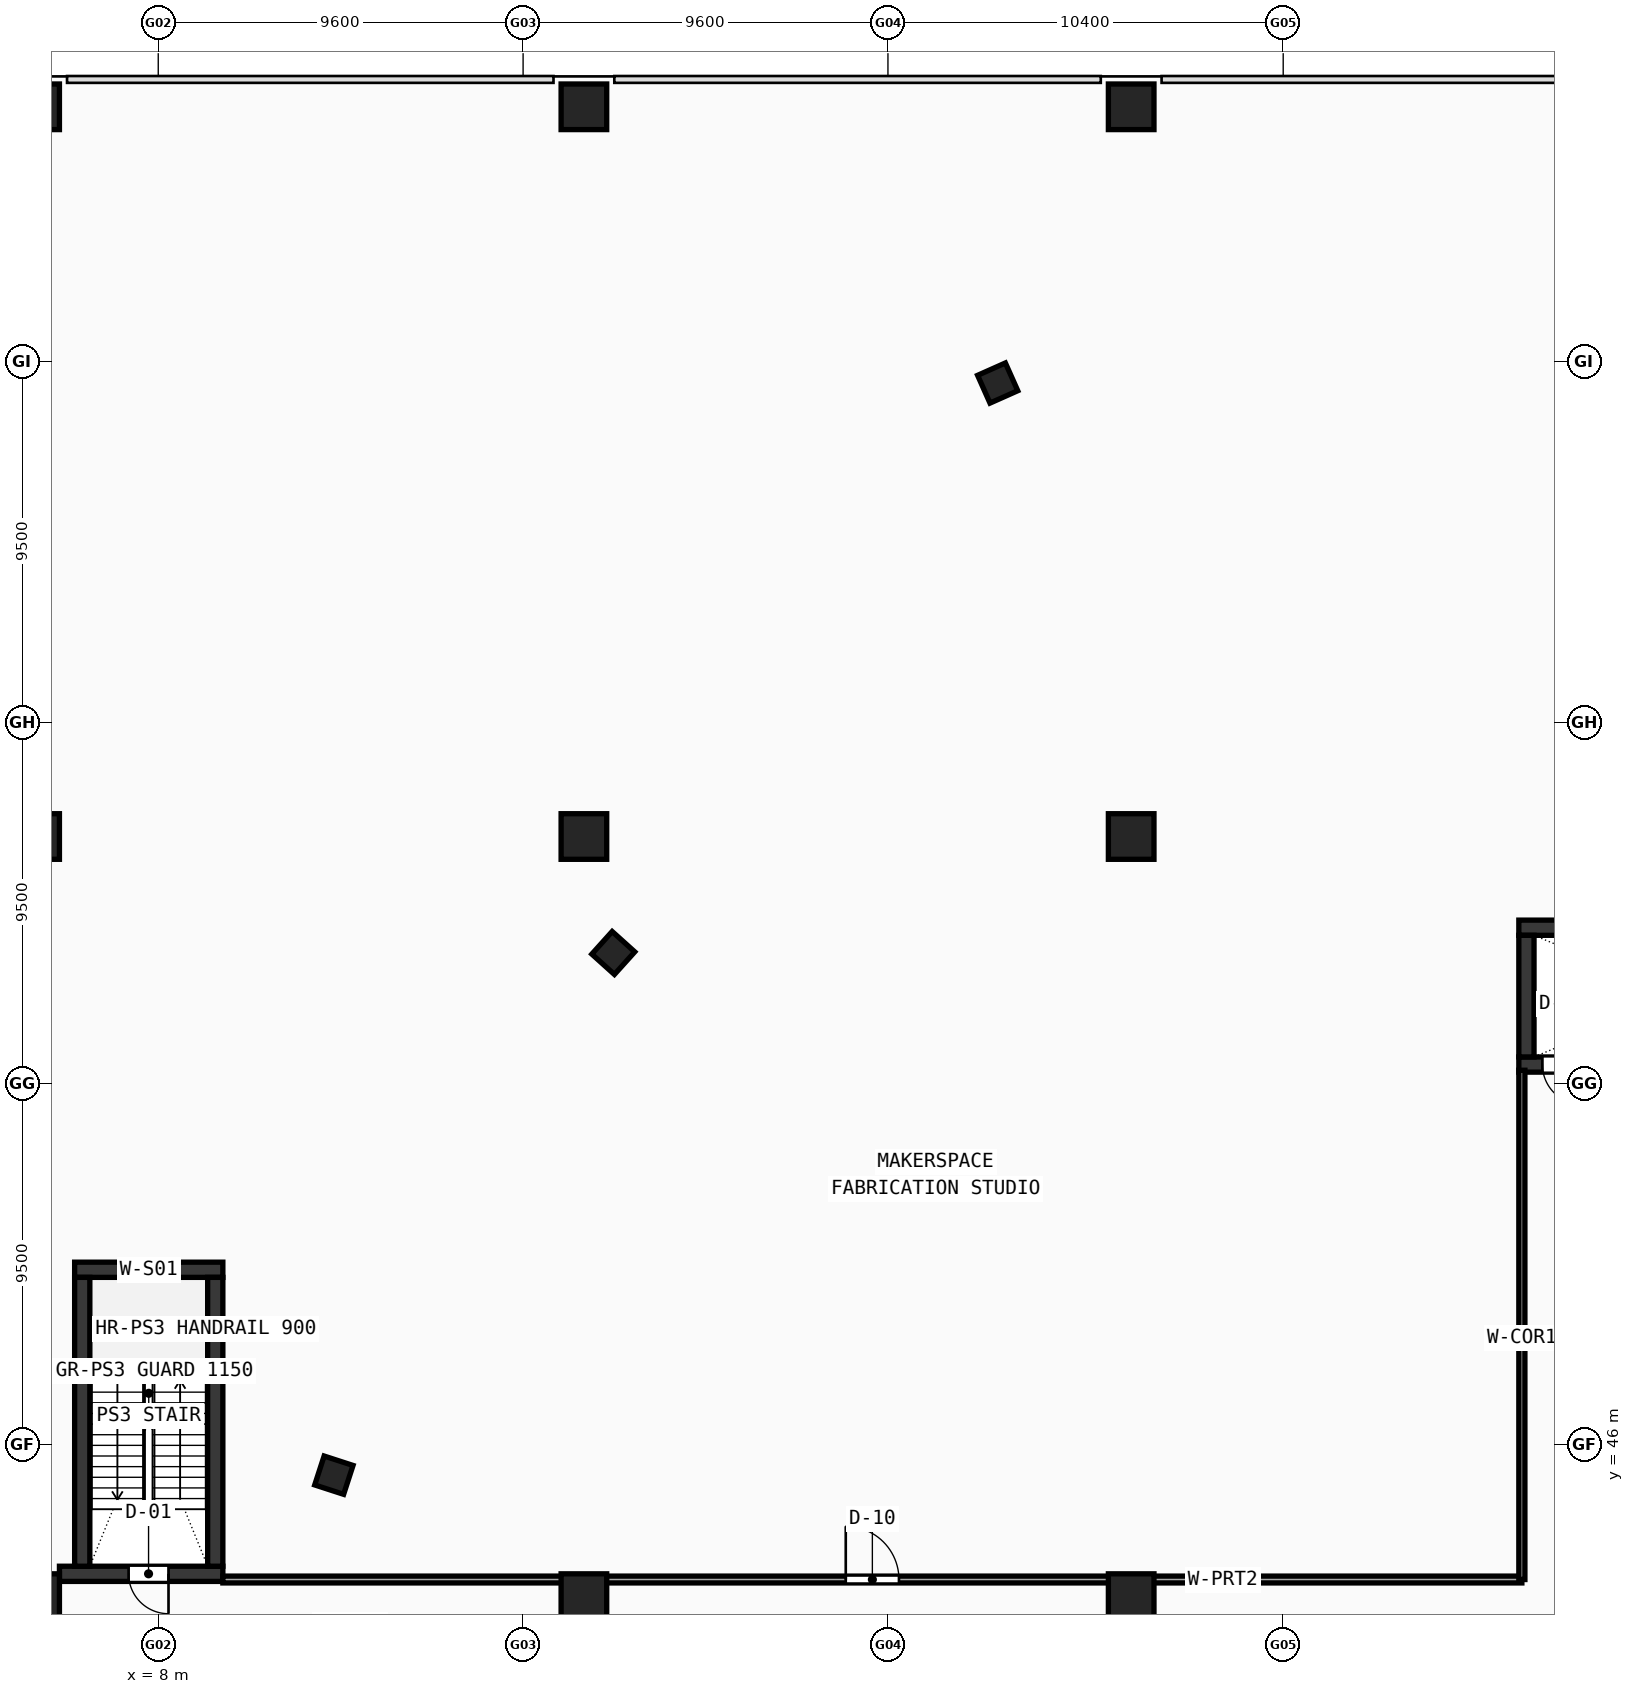
"""IFC4 building model, lengths in metres.
Left out: names, types, materials, properties, quantities, classifications, styles, units other than length and angle.
Written with IfcOpenShell. Run it as: python <this file> out.ifc"""

import sys

from ifc_helpers import new_model, si_unit, direction, frame, frame_2d, origin, origin_with_axes, origin_2d, place, context, subcontext, project, spatial, rectangle, hollow_rectangle, extrude, source, transform, mapped, element, fill, save


model = new_model("IFC4")
c1 = context("Model", 3, precision=1e-05, world=origin(), true_north=direction((0.0, 1.0)))
c2 = subcontext(c1, "Body", "Model", "MODEL_VIEW")
j1 = project(units=[si_unit("LENGTHUNIT", "METRE"), si_unit("PLANEANGLEUNIT", "RADIAN")], contexts=[c1])
p1 = place(None, origin())
s1 = spatial("IfcSite", under=j1, at=p1, CompositionType="ELEMENT")
p2 = place(p1, origin())
s2 = spatial("IfcBuilding", under=s1, at=p2, CompositionType="ELEMENT")
p3 = place(p2, frame((0.0, 0.0, 14.4)))
s3 = spatial("IfcBuildingStorey", under=s2, at=p3, CompositionType="ELEMENT", Elevation=14.4)
p4 = place(p3, frame((5.8, 50.6, 0.0), z_axis=(0.0, 0.0, 1.0), x_axis=(1.0, 0.0, 0.0)))
e1 = element("IfcWall", 1, at=p4, inside=s3, PredefinedType="SHEAR", context=c2, shape_type="SweptSolid", body=[
    extrude(rectangle(XDim=3.9, YDim=0.4, at=frame_2d((1.95, 0.0))), origin(), (0.0, 0.0, 1.0), 4.52),
])
p5 = place(p3, frame((5.4, 42.6, 0.0), z_axis=(0.0, 0.0, 1.0), x_axis=(1.0, 0.0, 0.0)))
e2 = element("IfcWall", 2, at=p5, inside=s3, PredefinedType="SHEAR", context=c2, shape_type="SweptSolid", body=[
    extrude(rectangle(XDim=4.3, YDim=0.4, at=frame_2d((2.15, 0.0))), origin(), (0.0, 0.0, 1.0), 4.52),
])
p6 = place(p5, frame((1.82, 0.0, 0.0)))
e3 = element("IfcOpeningElement", 3, at=p6, cuts=e2, PredefinedType="OPENING", context=c2, shape_type="SweptSolid", body=[
    extrude(rectangle(XDim=1.05, YDim=2.1, at=frame_2d((0.525, 1.05))), frame((0.0, 0.21, 0.0), z_axis=(0.0, -1.0, 0.0), x_axis=(1.0, 0.0, 0.0)), (0.0, 0.0, 1.0), 0.42),
])
for number, where, z_axis, x_axis in (
    (4, (6.0, 42.8, 0.0), (0.0, 0.0, 1.0), (0.0, 1.0, 0.0)),
    (5, (9.5, 42.8, 0.0), (0.0, 0.0, 1.0), (0.0, 1.0, 0.0)),
):
    element("IfcWall", number, at=place(p3, frame(where, z_axis=z_axis, x_axis=x_axis)), inside=s3, PredefinedType="SHEAR", context=c2, shape_type="SweptSolid", body=[
        extrude(rectangle(XDim=7.6, YDim=0.4, at=frame_2d((3.8, 0.0))), origin(), (0.0, 0.0, 1.0), 4.52),
    ])
p7 = place(p3, frame((43.8, 59.6, 0.0), z_axis=(0.0, 0.0, 1.0), x_axis=(1.0, 0.0, 0.0)))
e6 = element("IfcWall", 6, at=p7, inside=s3, PredefinedType="SHEAR", context=c2, shape_type="SweptSolid", body=[
    extrude(rectangle(XDim=8.5, YDim=0.4, at=frame_2d((4.25, 0.0))), origin(), (0.0, 0.0, 1.0), 4.52),
])
p8 = place(p3, frame((43.8, 56.0, 0.0), z_axis=(0.0, 0.0, 1.0), x_axis=(1.0, 0.0, 0.0)))
e7 = element("IfcWall", 7, at=p8, inside=s3, PredefinedType="SHEAR", context=c2, shape_type="SweptSolid", body=[
    extrude(rectangle(XDim=8.5, YDim=0.4, at=frame_2d((4.25, 0.0))), origin(), (0.0, 0.0, 1.0), 4.52),
])
p9 = place(p8, frame((0.62, 0.0, 0.0)))
e8 = element("IfcOpeningElement", 8, at=p9, cuts=e7, PredefinedType="OPENING", context=c2, shape_type="SweptSolid", body=[
    extrude(rectangle(XDim=1.05, YDim=2.1, at=frame_2d((0.525, 1.05))), frame((0.0, 0.21, 0.0), z_axis=(0.0, -1.0, 0.0), x_axis=(1.0, 0.0, 0.0)), (0.0, 0.0, 1.0), 0.42),
])
p10 = place(p3, frame((44.0, 56.2, 0.0), z_axis=(0.0, 0.0, 1.0), x_axis=(0.0, 1.0, 0.0)))
e9 = element("IfcWall", 9, at=p10, inside=s3, PredefinedType="SHEAR", context=c2, shape_type="SweptSolid", body=[
    extrude(rectangle(XDim=3.2, YDim=0.4, at=frame_2d((1.6, 0.0))), origin(), (0.0, 0.0, 1.0), 4.52),
])
m1 = source(origin(), c2, "Body", "SweptSolid", [
    extrude(hollow_rectangle(XDim=1.2, YDim=1.2, WallThickness=0.05, at=origin_2d()), origin(), (0.0, 0.0, 1.0), 4.8),
])
for number, where, z_axis, x_axis in (
    (10, (4.8, 42.0, -0.28), (0.0, 0.0, 1.0), (1.0, 0.0, 0.0)),
    (11, (4.8, 62.0, -0.28), (0.0, 0.0, 1.0), (1.0, 0.0, 0.0)),
    (12, (4.8, 81.2, -0.28), (0.0, 0.0, 1.0), (1.0, 0.0, 0.0)),
    (13, (19.2, 42.0, -0.28), (0.0, 0.0, 1.0), (1.0, 0.0, 0.0)),
    (14, (19.2, 62.0, -0.28), (0.0, 0.0, 1.0), (1.0, 0.0, 0.0)),
    (15, (19.2, 81.2, -0.28), (0.0, 0.0, 1.0), (1.0, 0.0, 0.0)),
    (16, (33.6, 42.0, -0.28), (0.0, 0.0, 1.0), (1.0, 0.0, 0.0)),
    (17, (33.6, 62.0, -0.28), (0.0, 0.0, 1.0), (1.0, 0.0, 0.0)),
    (18, (33.6, 81.2, -0.28), (0.0, 0.0, 1.0), (1.0, 0.0, 0.0)),
):
    element("IfcColumn", number, at=place(p3, frame(where, z_axis=z_axis, x_axis=x_axis)), inside=s3, PredefinedType="COLUMN", context=c2, shape_type="MappedRepresentation", body=[
        mapped(m1, transform((0.0, 0.0, 0.0), scale=1.0)),
    ])
m2 = source(origin(), c2, "Body", "SweptSolid", [
    extrude(hollow_rectangle(XDim=0.8, YDim=0.8, WallThickness=0.032, at=origin_2d()), origin(), (0.0, 0.0, 1.0), 4.8),
])
for number, where, z_axis, x_axis in (
    (19, (30.088, 73.932, -0.28), (0.0, 0.0, 1.0), (-0.914, -0.407, 0.0)),
    (20, (19.973, 58.935, -0.28), (0.0, 0.0, 1.0), (-0.669, -0.743, 0.0)),
    (21, (12.621, 45.196, -0.28), (0.0, 0.0, 1.0), (-0.309, -0.951, 0.0)),
):
    element("IfcColumn", number, at=place(p3, frame(where, z_axis=z_axis, x_axis=x_axis)), inside=s3, PredefinedType="COLUMN", context=c2, shape_type="MappedRepresentation", body=[
        mapped(m2, transform((0.0, 0.0, 0.0), scale=1.0)),
    ])
p11 = place(p3, frame((9.7, 42.45, 0.0), z_axis=(0.0, 0.0, 1.0), x_axis=(1.0, 0.0, 0.0)))
e22 = element("IfcWall", 22, at=p11, inside=s3, PredefinedType="PARTITIONING", context=c2, shape_type="SweptSolid", body=[
    extrude(rectangle(XDim=34.18, YDim=0.18, at=frame_2d((17.09, 0.0))), origin(), (0.0, 0.0, 1.0), 3.62),
])
p12 = place(p11, frame((16.39, 0.0, 0.0)))
e23 = element("IfcOpeningElement", 23, at=p12, cuts=e22, PredefinedType="OPENING", context=c2, shape_type="SweptSolid", body=[
    extrude(rectangle(XDim=1.4, YDim=2.15, at=frame_2d((0.7, 1.075))), frame((0.0, 0.1, 0.0), z_axis=(0.0, -1.0, 0.0), x_axis=(1.0, 0.0, 0.0)), (0.0, 0.0, 1.0), 0.2),
])
p13 = place(p3, frame((43.88, 42.45, 0.0), z_axis=(0.0, 0.0, 1.0), x_axis=(0.0, 1.0, 0.0)))
e24 = element("IfcWall", 24, at=p13, inside=s3, PredefinedType="PARTITIONING", context=c2, shape_type="SweptSolid", body=[
    extrude(rectangle(XDim=13.4, YDim=0.16, at=frame_2d((6.7, 0.0))), origin(), (0.0, 0.0, 1.0), 4.12),
])
m3 = source(origin(), c2, "Body", "SweptSolid", [
    extrude(rectangle(XDim=1.05, YDim=2.1, at=frame_2d((0.525, 1.05))), frame((0.0, 0.025, 0.0), z_axis=(0.0, -1.0, 0.0), x_axis=(1.0, 0.0, 0.0)), (0.0, 0.0, 1.0), 0.05),
])
p14 = place(p6, frame((1.05, 0.0, 0.0), z_axis=(0.0, 0.0, 1.0), x_axis=(-1.0, 0.0, 0.0)))
e25 = element("IfcDoor", 25, at=p14, inside=s3, OperationType="SINGLE_SWING_LEFT", PredefinedType="DOOR", context=c2, shape_type="MappedRepresentation", body=[
    mapped(m3, transform((0.0, 0.0, 0.0), scale=1.0)),
])
fill(e3, e25)
p15 = place(p9, frame((1.05, 0.0, 0.0), z_axis=(0.0, 0.0, 1.0), x_axis=(-1.0, 0.0, 0.0)))
e26 = element("IfcDoor", 26, at=p15, inside=s3, OperationType="SINGLE_SWING_LEFT", PredefinedType="DOOR", context=c2, shape_type="MappedRepresentation", body=[
    mapped(m3, transform((0.0, 0.0, 0.0), scale=1.0)),
])
fill(e8, e26)
m4 = source(origin(), c2, "Body", "SweptSolid", [
    extrude(rectangle(XDim=1.4, YDim=2.15, at=frame_2d((0.7, 1.075))), frame((0.0, 0.025, 0.0), z_axis=(0.0, -1.0, 0.0), x_axis=(1.0, 0.0, 0.0)), (0.0, 0.0, 1.0), 0.05),
])
p16 = place(p12, origin_with_axes())
e27 = element("IfcDoor", 27, at=p16, inside=s3, OperationType="SINGLE_SWING_LEFT", PredefinedType="DOOR", context=c2, shape_type="MappedRepresentation", body=[
    mapped(m4, transform((0.0, 0.0, 0.0), scale=1.0)),
])
fill(e23, e27)
save(model, sys.argv[1])
